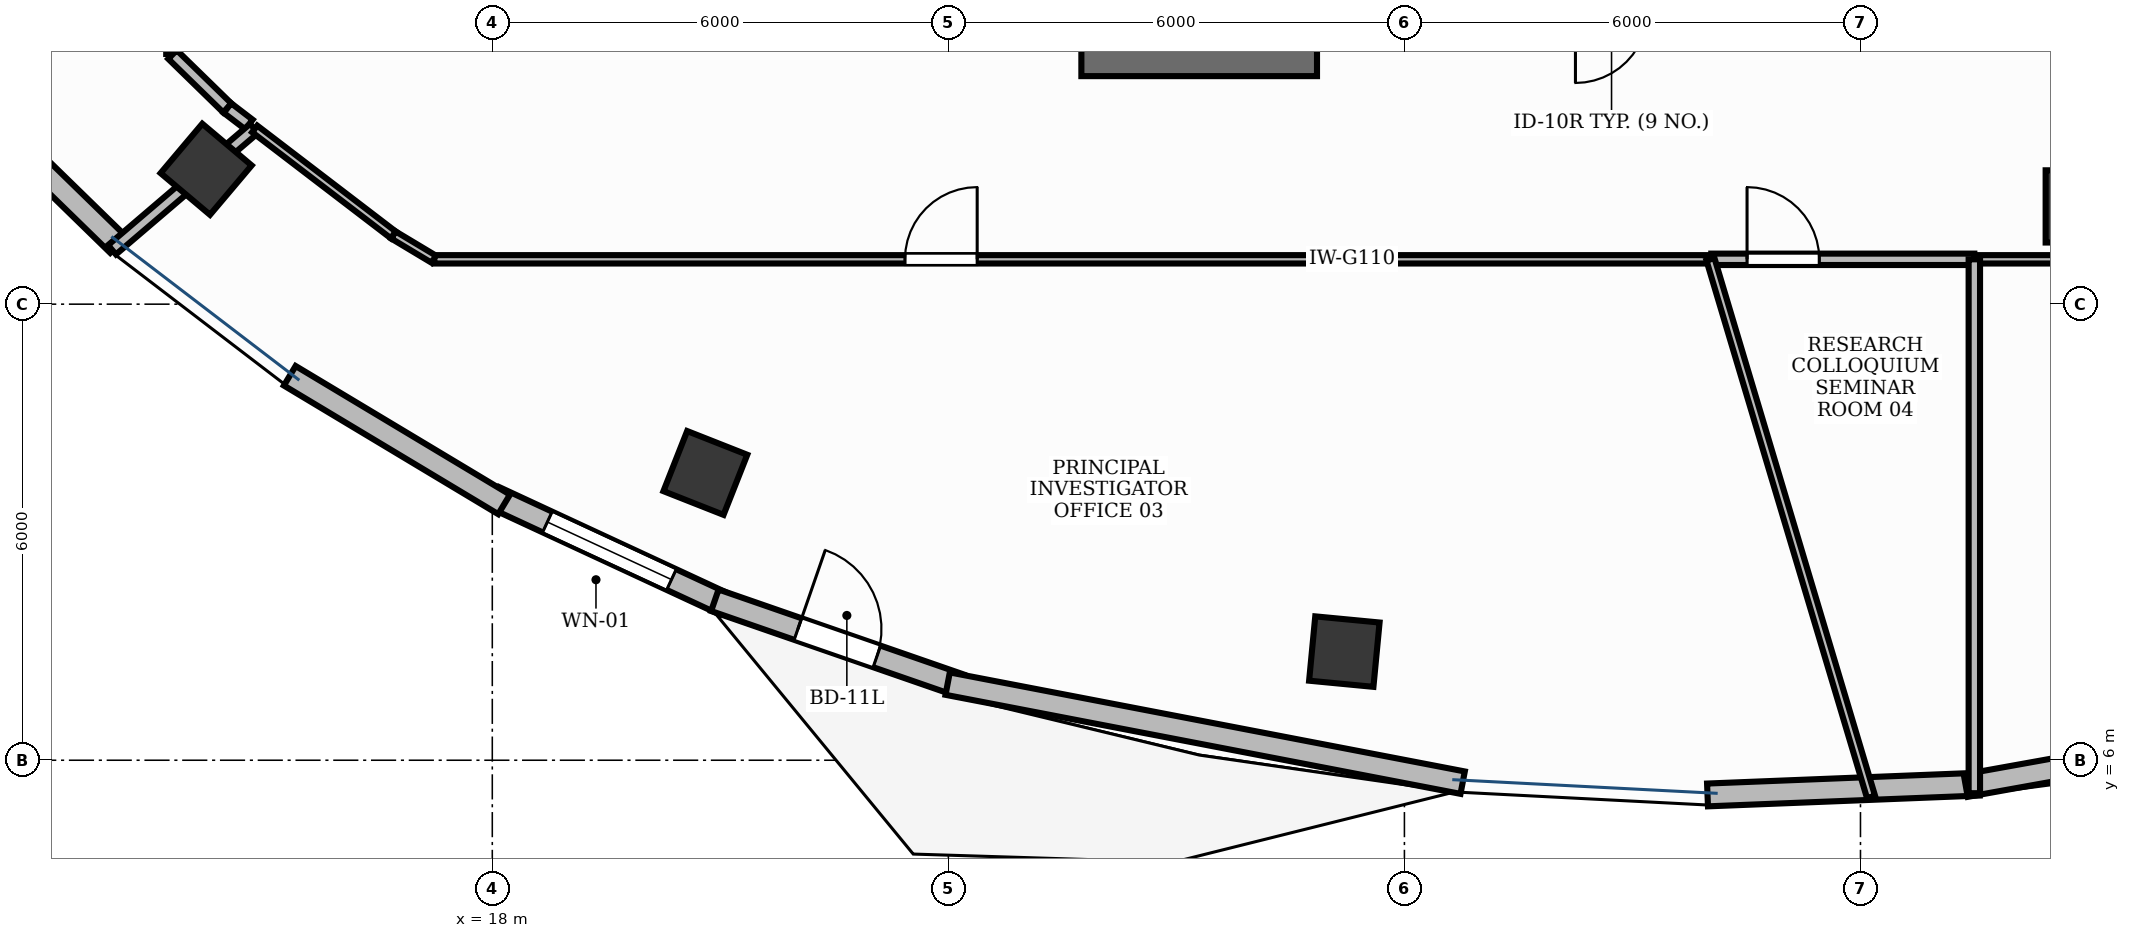
"""IFC4 building model, lengths in metres.
Left out: names, types, materials, properties, quantities, classifications, styles, units other than length and angle.
Written with IfcOpenShell. Run it as: python <this file> out.ifc"""

import sys

from ifc_helpers import new_model, si_unit, direction, frame, frame_2d, origin, origin_2d, place, context, subcontext, project, spatial, rectangle, extrude, element, fill, save


model = new_model("IFC4")
c1 = context("Model", 3, precision=1e-05, world=origin(), true_north=direction((0.0, 1.0)))
c2 = subcontext(c1, "Body", "Model", "MODEL_VIEW")
j1 = project(units=[si_unit("LENGTHUNIT", "METRE"), si_unit("PLANEANGLEUNIT", "RADIAN")], contexts=[c1])
p1 = place(None, origin())
s1 = spatial("IfcSite", under=j1, at=p1, CompositionType="ELEMENT")
p2 = place(p1, origin())
s2 = spatial("IfcBuilding", under=s1, at=p2, CompositionType="ELEMENT")
p3 = place(p2, frame((0.0, 0.0, 247.8)))
s3 = spatial("IfcBuildingStorey", under=s2, at=p3, CompositionType="ELEMENT", Elevation=247.8)
p4 = place(p3, frame((25.75, 15.2, 0.0), z_axis=(0.0, 0.0, 1.0), x_axis=(1.0, 0.0, 0.0)))
e1 = element("IfcWall", 1, at=p4, inside=s3, PredefinedType="SHEAR", context=c2, shape_type="SweptSolid", body=[
    extrude(rectangle(XDim=3.1, YDim=0.4, at=frame_2d((1.55, 0.0))), origin(), (0.0, 0.0, 1.0), 3.9),
])
for number, where, z_axis, x_axis in (
    (2, (14.235, 13.775, -0.0), (0.0, 0.0, 1.0), (-0.764, 0.645, 0.0)),
    (3, (20.803, 9.78, -0.0), (0.0, 0.0, 1.0), (-0.93, 0.367, 0.0)),
    (4, (29.21, 7.429, -0.0), (0.0, 0.0, 1.0), (-0.995, 0.095, 0.0)),
):
    element("IfcColumn", number, at=place(p3, frame(where, z_axis=z_axis, x_axis=x_axis)), inside=s3, PredefinedType="COLUMN", context=c2, shape_type="SweptSolid", body=[
        extrude(rectangle(XDim=0.85, YDim=0.85, at=origin_2d()), origin(), (0.0, 0.0, 1.0), 3.901),
    ])
p5 = place(p3, frame((38.911, 13.286, -0.0), z_axis=(0.0, 0.0, 1.0), x_axis=(1.0, 0.0, 0.0)))
e5 = element("IfcColumn", 5, at=p5, inside=s3, PredefinedType="COLUMN", context=c2, shape_type="SweptSolid", body=[
    extrude(rectangle(XDim=0.95, YDim=0.95, at=origin_2d()), origin(), (0.0, 0.0, 1.0), 3.901),
])
p6 = place(p3, frame((18.028, 9.458, 0.0), z_axis=(0.0, 0.0, 1.0), x_axis=(0.907141680649, -0.420825345278, 0.0)))
e6 = element("IfcWall", 6, at=p6, inside=s3, PredefinedType="STANDARD", context=c2, shape_type="SweptSolid", body=[
    extrude(rectangle(XDim=3.336, YDim=0.3, at=frame_2d((1.668, 0.0))), origin(), (0.0, 0.0, 1.0), 3.9),
])
p7 = place(p6, frame((0.768, 0.0, 0.9)))
e7 = element("IfcOpeningElement", 7, at=p7, cuts=e6, PredefinedType="OPENING", context=c2, shape_type="SweptSolid", body=[
    extrude(rectangle(XDim=1.8, YDim=2.1, at=frame_2d((0.9, 1.05))), frame((0.0, 0.165, 0.0), z_axis=(0.0, -1.0, 0.0), x_axis=(1.0, 0.0, 0.0)), (0.0, 0.0, 1.0), 0.33),
])
p8 = place(p3, frame((20.928, 8.104, 0.0), z_axis=(0.0, 0.0, 1.0), x_axis=(0.944837969822, -0.327538105849, 0.0)))
e8 = element("IfcWall", 8, at=p8, inside=s3, PredefinedType="STANDARD", context=c2, shape_type="SweptSolid", body=[
    extrude(rectangle(XDim=3.412, YDim=0.3, at=frame_2d((1.706, 0.0))), origin(), (0.0, 0.0, 1.0), 3.9),
])
p9 = place(p8, frame((1.156, 0.0, 0.0)))
e9 = element("IfcOpeningElement", 9, at=p9, cuts=e8, PredefinedType="OPENING", context=c2, shape_type="SweptSolid", body=[
    extrude(rectangle(XDim=1.1, YDim=2.15, at=frame_2d((0.55, 1.075))), frame((0.0, 0.165, 0.0), z_axis=(0.0, -1.0, 0.0), x_axis=(1.0, 0.0, 0.0)), (0.0, 0.0, 1.0), 0.33),
])
p10 = place(p3, frame((10.863, 14.942, 0.0), z_axis=(0.0, 0.0, 1.0), x_axis=(0.71600802955, -0.698092043802, 0.0)))
e10 = element("IfcWall", 10, at=p10, inside=s3, PredefinedType="STANDARD", context=c2, shape_type="SweptSolid", body=[
    extrude(rectangle(XDim=3.093, YDim=0.3, at=frame_2d((1.547, 0.0))), origin(), (0.0, 0.0, 1.0), 3.47),
])
p11 = place(p3, frame((15.335, 11.058, 0.0), z_axis=(0.0, 0.0, 1.0), x_axis=(0.857525678966, -0.514441162732, 0.0)))
e11 = element("IfcWall", 11, at=p11, inside=s3, PredefinedType="STANDARD", context=c2, shape_type="SweptSolid", body=[
    extrude(rectangle(XDim=3.288, YDim=0.3, at=frame_2d((1.644, 0.0))), origin(), (0.0, 0.0, 1.0), 3.9),
])
p12 = place(p3, frame((23.991, 7.008, 0.0), z_axis=(0.0, 0.0, 1.0), x_axis=(0.982011242269, -0.188822456443, 0.0)))
e12 = element("IfcWall", 12, at=p12, inside=s3, PredefinedType="STANDARD", context=c2, shape_type="SweptSolid", body=[
    extrude(rectangle(XDim=6.899, YDim=0.3, at=frame_2d((3.45, 0.0))), origin(), (0.0, 0.0, 1.0), 3.9),
])
p13 = place(p3, frame((33.988, 5.543, 0.0), z_axis=(0.0, 0.0, 1.0), x_axis=(0.999208461954, 0.039780014567, 0.0)))
e13 = element("IfcWall", 13, at=p13, inside=s3, PredefinedType="STANDARD", context=c2, shape_type="SweptSolid", body=[
    extrude(rectangle(XDim=3.578, YDim=0.3, at=frame_2d((1.789, 0.0))), origin(), (0.0, 0.0, 1.0), 3.9),
])
p14 = place(p3, frame((37.385, 5.666, 0.0), z_axis=(0.0, 0.0, 1.0), x_axis=(0.984214602488, 0.176979140719, 0.0)))
e14 = element("IfcWall", 14, at=p14, inside=s3, PredefinedType="STANDARD", context=c2, shape_type="SweptSolid", body=[
    extrude(rectangle(XDim=6.91, YDim=0.3, at=frame_2d((3.455, 0.0))), origin(), (0.0, 0.0, 1.0), 3.9),
])
p15 = place(p3, frame((13.79, 21.79, 0.0), z_axis=(0.0, 0.0, 1.0), x_axis=(0.0, -1.0, 0.0)))
e15 = element("IfcWall", 15, at=p15, inside=s3, PredefinedType="PARTITIONING", context=c2, shape_type="SweptSolid", body=[
    extrude(rectangle(XDim=6.499, YDim=0.16, at=frame_2d((3.249, 0.0))), origin(), (0.0, 0.0, 1.0), 2.91),
])
p16 = place(p15, frame((0.24, 0.0, 0.0)))
e16 = element("IfcOpeningElement", 16, at=p16, cuts=e15, PredefinedType="OPENING", context=c2, shape_type="SweptSolid", body=[
    extrude(rectangle(XDim=0.95, YDim=2.15, at=frame_2d((0.475, 1.075))), frame((0.0, 0.095, 0.0), z_axis=(0.0, -1.0, 0.0), x_axis=(1.0, 0.0, 0.0)), (0.0, 0.0, 1.0), 0.19),
])
p17 = place(p3, frame((17.236, 12.59, 0.0), z_axis=(0.0, 0.0, 1.0), x_axis=(1.0, 0.0, 0.0)))
e17 = element("IfcWall", 17, at=p17, inside=s3, PredefinedType="MOVABLE", context=c2, shape_type="SweptSolid", body=[
    extrude(rectangle(XDim=16.791, YDim=0.11, at=frame_2d((8.396, 0.0))), origin(), (0.0, 0.0, 1.0), 2.91),
])
p18 = place(p17, frame((6.194, 0.0, 0.0)))
e18 = element("IfcOpeningElement", 18, at=p18, cuts=e17, PredefinedType="OPENING", context=c2, shape_type="SweptSolid", body=[
    extrude(rectangle(XDim=0.95, YDim=2.15, at=frame_2d((0.475, 1.075))), frame((0.0, 0.07, 0.0), z_axis=(0.0, -1.0, 0.0), x_axis=(1.0, 0.0, 0.0)), (0.0, 0.0, 1.0), 0.14),
])
p19 = place(p3, frame((34.037, 12.59, 0.0), z_axis=(0.0, 0.0, 1.0), x_axis=(1.0, 0.0, 0.0)))
e19 = element("IfcWall", 19, at=p19, inside=s3, PredefinedType="PARTITIONING", context=c2, shape_type="SweptSolid", body=[
    extrude(rectangle(XDim=3.461, YDim=0.15, at=frame_2d((1.73, 0.0))), origin(), (0.0, 0.0, 1.0), 2.91),
])
p20 = place(p19, frame((0.471, 0.0, 0.0)))
e20 = element("IfcOpeningElement", 20, at=p20, cuts=e19, PredefinedType="OPENING", context=c2, shape_type="SweptSolid", body=[
    extrude(rectangle(XDim=0.95, YDim=2.15, at=frame_2d((0.475, 1.075))), frame((0.0, 0.09, 0.0), z_axis=(0.0, -1.0, 0.0), x_axis=(1.0, 0.0, 0.0)), (0.0, 0.0, 1.0), 0.18),
])
p21 = place(p3, frame((37.508, 12.59, 0.0), z_axis=(0.0, 0.0, 1.0), x_axis=(1.0, 0.0, 0.0)))
e21 = element("IfcWall", 21, at=p21, inside=s3, PredefinedType="MOVABLE", context=c2, shape_type="SweptSolid", body=[
    extrude(rectangle(XDim=6.992, YDim=0.11, at=frame_2d((3.496, 0.0))), origin(), (0.0, 0.0, 1.0), 2.91),
])
p22 = place(p21, frame((3.284, 0.0, 0.0)))
e22 = element("IfcOpeningElement", 22, at=p22, cuts=e21, PredefinedType="OPENING", context=c2, shape_type="SweptSolid", body=[
    extrude(rectangle(XDim=0.95, YDim=2.15, at=frame_2d((0.475, 1.075))), frame((0.0, 0.07, 0.0), z_axis=(0.0, -1.0, 0.0), x_axis=(1.0, 0.0, 0.0)), (0.0, 0.0, 1.0), 0.14),
])
p23 = place(p3, frame((13.793, 15.284, 0.0), z_axis=(0.0, 0.0, 1.0), x_axis=(0.7160122468, -0.698087718294, 0.0)))
e23 = element("IfcWall", 23, at=p23, inside=s3, PredefinedType="PARTITIONING", context=c2, shape_type="SweptSolid", body=[
    extrude(rectangle(XDim=1.008, YDim=0.16, at=frame_2d((0.504, 0.0))), origin(), (0.0, 0.0, 1.0), 2.91),
])
p24 = place(p3, frame((14.516, 14.58, 0.0), z_axis=(0.0, 0.0, 1.0), x_axis=(0.794124394036, -0.607755252381, 0.0)))
e24 = element("IfcWall", 24, at=p24, inside=s3, PredefinedType="PARTITIONING", context=c2, shape_type="SweptSolid", body=[
    extrude(rectangle(XDim=0.356, YDim=0.16, at=frame_2d((0.178, 0.0))), origin(), (0.0, 0.0, 1.0), 2.91),
])
p25 = place(p3, frame((14.866, 14.312, 0.0), z_axis=(0.0, 0.0, 1.0), x_axis=(-0.760432930585, -0.649416475062, 0.0)))
e25 = element("IfcWall", 25, at=p25, inside=s3, PredefinedType="PARTITIONING", context=c2, shape_type="SweptSolid", body=[
    extrude(rectangle(XDim=2.459, YDim=0.16, at=frame_2d((1.229, 0.0))), origin(), (0.0, 0.0, 1.0), 2.91),
])
p26 = place(p3, frame((14.874, 14.306, 0.0), z_axis=(0.0, 0.0, 1.0), x_axis=(0.794366882066, -0.607438273965, 0.0)))
e26 = element("IfcWall", 26, at=p26, inside=s3, PredefinedType="MOVABLE", context=c2, shape_type="SweptSolid", body=[
    extrude(rectangle(XDim=2.297, YDim=0.11, at=frame_2d((1.149, 0.0))), origin(), (0.0, 0.0, 1.0), 2.91),
])
p27 = place(p3, frame((16.7, 12.91, 0.0), z_axis=(0.0, 0.0, 1.0), x_axis=(0.857458106414, -0.514553783141, 0.0)))
e27 = element("IfcWall", 27, at=p27, inside=s3, PredefinedType="MOVABLE", context=c2, shape_type="SweptSolid", body=[
    extrude(rectangle(XDim=0.619, YDim=0.11, at=frame_2d((0.309, 0.0))), origin(), (0.0, 0.0, 1.0), 2.91),
])
p28 = place(p3, frame((34.027, 12.59, 0.0), z_axis=(0.0, 0.0, 1.0), x_axis=(0.286155182725, -0.958183286955, 0.0)))
e28 = element("IfcWall", 28, at=p28, inside=s3, PredefinedType="MOVABLE", context=c2, shape_type="SweptSolid", body=[
    extrude(rectangle(XDim=7.382, YDim=0.11, at=frame_2d((3.691, 0.0))), origin(), (0.0, 0.0, 1.0), 2.91),
])
p29 = place(p3, frame((37.498, 12.59, 0.0), z_axis=(0.0, 0.0, 1.0), x_axis=(0.0, -1.0, 0.0)))
e29 = element("IfcWall", 29, at=p29, inside=s3, PredefinedType="PARTITIONING", context=c2, shape_type="SweptSolid", body=[
    extrude(rectangle(XDim=7.024, YDim=0.15, at=frame_2d((3.512, 0.0))), origin(), (0.0, 0.0, 1.0), 2.91),
])
p30 = place(p7, origin())
e30 = element("IfcWindow", 30, at=p30, inside=s3, PartitioningType="SINGLE_PANEL", PredefinedType="WINDOW", context=c2, shape_type="SweptSolid", body=[
    extrude(rectangle(XDim=1.8, YDim=2.1, at=frame_2d((0.9, 1.05))), frame((0.0, 0.03, 0.0), z_axis=(0.0, -1.0, 0.0), x_axis=(1.0, 0.0, 0.0)), (0.0, 0.0, 1.0), 0.06),
])
fill(e7, e30)
p31 = place(p9, origin())
e31 = element("IfcDoor", 31, at=p31, inside=s3, OperationType="SINGLE_SWING_LEFT", PredefinedType="DOOR", context=c2, shape_type="SweptSolid", body=[
    extrude(rectangle(XDim=1.1, YDim=2.15, at=frame_2d((0.55, 1.075))), frame((0.0, 0.025, 0.0), z_axis=(0.0, -1.0, 0.0), x_axis=(1.0, 0.0, 0.0)), (0.0, 0.0, 1.0), 0.05),
])
fill(e9, e31)
p32 = place(p18, origin())
e32 = element("IfcDoor", 32, at=p32, inside=s3, OperationType="SINGLE_SWING_RIGHT", PredefinedType="DOOR", context=c2, shape_type="SweptSolid", body=[
    extrude(rectangle(XDim=0.95, YDim=2.15, at=frame_2d((0.475, 1.075))), frame((0.0, 0.025, 0.0), z_axis=(0.0, -1.0, 0.0), x_axis=(1.0, 0.0, 0.0)), (0.0, 0.0, 1.0), 0.05),
])
fill(e18, e32)
p33 = place(p20, origin())
e33 = element("IfcDoor", 33, at=p33, inside=s3, OperationType="SINGLE_SWING_LEFT", PredefinedType="DOOR", context=c2, shape_type="SweptSolid", body=[
    extrude(rectangle(XDim=0.95, YDim=2.15, at=frame_2d((0.475, 1.075))), frame((0.0, 0.025, 0.0), z_axis=(0.0, -1.0, 0.0), x_axis=(1.0, 0.0, 0.0)), (0.0, 0.0, 1.0), 0.05),
])
fill(e20, e33)
save(model, sys.argv[1])
